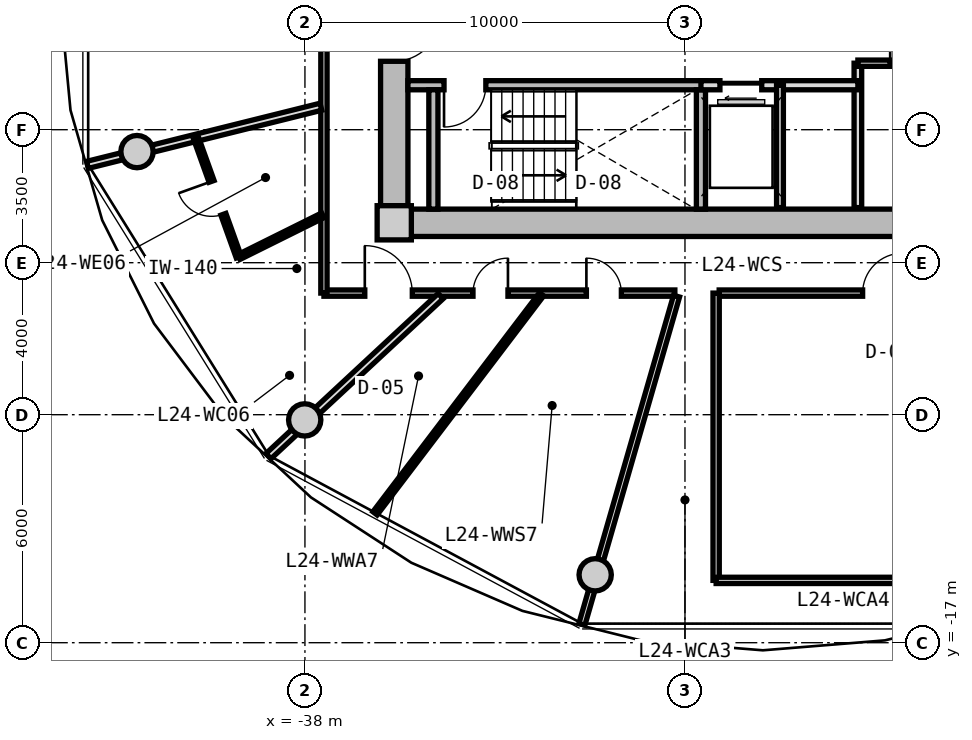
"""IFC4 building model, lengths in metres.
Left out: names, types, materials, properties, quantities, classifications, styles, units other than length and angle.
Written with IfcOpenShell. Run it as: python <this file> out.ifc"""

import sys

from ifc_helpers import new_model, si_unit, direction, frame, frame_2d, origin, origin_2d, place, context, subcontext, project, spatial, rectangle, circle, extrude, source, transform, mapped, element, fill, save


model = new_model("IFC4")
c1 = context("Model", 3, precision=1e-05, world=origin(), true_north=direction((0.0, 1.0)))
c2 = subcontext(c1, "Body", "Model", "MODEL_VIEW")
j1 = project(units=[si_unit("LENGTHUNIT", "METRE"), si_unit("PLANEANGLEUNIT", "RADIAN")], contexts=[c1])
p1 = place(None, origin())
s1 = spatial("IfcSite", under=j1, at=p1, CompositionType="ELEMENT")
p2 = place(p1, origin())
s2 = spatial("IfcBuilding", under=s1, at=p2, CompositionType="ELEMENT")
p3 = place(p2, frame((0.0, 0.0, 81.0)))
s3 = spatial("IfcBuildingStorey", under=s2, at=p3, CompositionType="ELEMENT", Elevation=81.0)
m1 = source(origin(), c2, "Body", "SweptSolid", [
    extrude(rectangle(XDim=0.9, YDim=0.9, at=origin_2d()), origin(), (0.0, 0.0, 1.0), 3.05),
])
p4 = place(p3, frame((-35.65, -5.95, 0.0), z_axis=(0.0, 0.0, 1.0), x_axis=(1.0, 0.0, 0.0)))
e1 = element("IfcColumn", 1, at=p4, inside=s3, PredefinedType="COLUMN", context=c2, shape_type="MappedRepresentation", body=[
    mapped(m1, transform((0.0, 0.0, 0.0), x_axis=(1.0, 0.0, 0.0), y_axis=(0.0, 1.0, 0.0), z_axis=(0.0, 0.0, 1.0), scale=1.0)),
])
m2 = source(origin(), c2, "Body", "SweptSolid", [
    extrude(rectangle(XDim=14.4, YDim=0.72, at=frame_2d((7.2, 0.0))), origin(), (0.0, 0.0, 1.0), 2.79),
])
p5 = place(p3, frame((-20.8, -5.95, 0.0), z_axis=(0.0, 0.0, 1.0), x_axis=(-1.0, 0.0, 0.0)))
e2 = element("IfcWall", 2, at=p5, inside=s3, PredefinedType="SHEAR", context=c2, shape_type="MappedRepresentation", body=[
    mapped(m2, transform((0.0, 0.0, 0.0), x_axis=(1.0, 0.0, 0.0), y_axis=(0.0, 1.0, 0.0), z_axis=(0.0, 0.0, 1.0), scale=1.0)),
])
m3 = source(origin(), c2, "Body", "SweptSolid", [
    extrude(rectangle(XDim=11.0, YDim=0.72, at=frame_2d((5.5, 0.0))), origin(), (0.0, 0.0, 1.0), 2.79),
])
p6 = place(p3, frame((-35.65, -5.5, 0.0), z_axis=(0.0, 0.0, 1.0), x_axis=(0.0, 1.0, 0.0)))
e3 = element("IfcWall", 3, at=p6, inside=s3, PredefinedType="SHEAR", context=c2, shape_type="MappedRepresentation", body=[
    mapped(m3, transform((0.0, 0.0, 0.0), x_axis=(1.0, 0.0, 0.0), y_axis=(0.0, 1.0, 0.0), z_axis=(0.0, 0.0, 1.0), scale=1.0)),
])
p7 = place(p6, frame((3.8, 0.0, 0.0)))
e4 = element("IfcOpeningElement", 4, at=p7, cuts=e3, PredefinedType="OPENING", context=c2, shape_type="SweptSolid", body=[
    extrude(rectangle(XDim=1.2, YDim=2.15, at=frame_2d((0.6, 1.075))), frame((0.0, 0.37, 0.0), z_axis=(0.0, -1.0, 0.0), x_axis=(1.0, 0.0, 0.0)), (0.0, 0.0, 1.0), 0.74),
])
m4 = source(origin(), c2, "Body", "SweptSolid", [
    extrude(circle(Radius=0.425, at=origin_2d()), origin(), (0.0, 0.0, 1.0), 3.05),
])
for number, where, z_axis, x_axis in (
    (5, (-42.419, -4.076, 0.0), (0.0, 0.0, 1.0), (1.0, 0.0, 0.0)),
    (6, (-38.006, -11.137, 0.0), (0.0, 0.0, 1.0), (1.0, 0.0, 0.0)),
    (7, (-30.363, -15.213, 0.0), (0.0, 0.0, 1.0), (1.0, 0.0, 0.0)),
):
    element("IfcColumn", number, at=place(p3, frame(where, z_axis=z_axis, x_axis=x_axis)), inside=s3, PredefinedType="COLUMN", context=c2, shape_type="MappedRepresentation", body=[
        mapped(m4, transform((0.0, 0.0, 0.0), x_axis=(1.0, 0.0, 0.0), y_axis=(0.0, 1.0, 0.0), z_axis=(0.0, 0.0, 1.0), scale=1.0)),
    ])
m5 = source(origin(), c2, "Body", "SweptSolid", [
    extrude(rectangle(XDim=7.83, YDim=0.24, at=frame_2d((3.915, 0.0))), origin(), (0.0, 0.0, 1.0), 2.79),
])
p8 = place(p3, frame((-35.29, -2.33, 0.0), z_axis=(0.0, 0.0, 1.0), x_axis=(1.0, 0.0, 0.0)))
e8 = element("IfcWall", 8, at=p8, inside=s3, PredefinedType="PARTITIONING", context=c2, shape_type="MappedRepresentation", body=[
    mapped(m5, transform((0.0, 0.0, 0.0), x_axis=(1.0, 0.0, 0.0), y_axis=(0.0, 1.0, 0.0), z_axis=(0.0, 0.0, 1.0), scale=1.0)),
])
p9 = place(p8, frame((0.95, 0.0, 0.0)))
e9 = element("IfcOpeningElement", 9, at=p9, cuts=e8, PredefinedType="OPENING", context=c2, shape_type="SweptSolid", body=[
    extrude(rectangle(XDim=1.1, YDim=2.15, at=frame_2d((0.55, 1.075))), frame((0.0, 0.13, 0.0), z_axis=(0.0, -1.0, 0.0), x_axis=(1.0, 0.0, 0.0)), (0.0, 0.0, 1.0), 0.26),
])
m6 = source(origin(), c2, "Body", "SweptSolid", [
    extrude(rectangle(XDim=3.14, YDim=0.24, at=frame_2d((1.57, 0.0))), origin(), (0.0, 0.0, 1.0), 2.79),
])
for number, where, z_axis, x_axis in (
    (10, (-34.62, -5.59, 0.0), (0.0, 0.0, 1.0), (0.0, 1.0, 0.0)),
    (11, (-27.58, -5.59, 0.0), (0.0, 0.0, 1.0), (0.0, 1.0, 0.0)),
):
    element("IfcWall", number, at=place(p3, frame(where, z_axis=z_axis, x_axis=x_axis)), inside=s3, PredefinedType="PARTITIONING", context=c2, shape_type="MappedRepresentation", body=[
        mapped(m6, transform((0.0, 0.0, 0.0), x_axis=(1.0, 0.0, 0.0), y_axis=(0.0, 1.0, 0.0), z_axis=(0.0, 0.0, 1.0), scale=1.0)),
    ])
m7 = source(origin(), c2, "Body", "SweptSolid", [
    extrude(rectangle(XDim=3.8, YDim=0.2, at=frame_2d((1.9, 0.0))), origin(), (0.0, 0.0, 1.0), 2.775),
])
p10 = place(p3, frame((-23.45, -5.55, 0.0), z_axis=(0.0, 0.0, 1.0), x_axis=(0.0, 1.0, 0.0)))
e12 = element("IfcWall", 12, at=p10, inside=s3, PredefinedType="PARTITIONING", context=c2, shape_type="MappedRepresentation", body=[
    mapped(m7, transform((0.0, 0.0, 0.0), x_axis=(1.0, 0.0, 0.0), y_axis=(0.0, 1.0, 0.0), z_axis=(0.0, 0.0, 1.0), scale=1.0)),
])
m8 = source(origin(), c2, "Body", "SweptSolid", [
    extrude(rectangle(XDim=4.13, YDim=0.24, at=frame_2d((2.065, 0.0))), origin(), (0.0, 0.0, 1.0), 2.775),
])
p11 = place(p3, frame((-27.58, -2.33, 0.0), z_axis=(0.0, 0.0, 1.0), x_axis=(1.0, 0.0, 0.0)))
e13 = element("IfcWall", 13, at=p11, inside=s3, PredefinedType="PARTITIONING", context=c2, shape_type="MappedRepresentation", body=[
    mapped(m8, transform((0.0, 0.0, 0.0), x_axis=(1.0, 0.0, 0.0), y_axis=(0.0, 1.0, 0.0), z_axis=(0.0, 0.0, 1.0), scale=1.0)),
])
p12 = place(p11, frame((0.5, 0.0, 0.0)))
e14 = element("IfcOpeningElement", 14, at=p12, cuts=e13, PredefinedType="OPENING", context=c2, shape_type="SweptSolid", body=[
    extrude(rectangle(XDim=1.1, YDim=2.2, at=frame_2d((0.55, 1.1))), frame((0.0, 0.13, 0.0), z_axis=(0.0, -1.0, 0.0), x_axis=(1.0, 0.0, 0.0)), (0.0, 0.0, 1.0), 0.26),
])
m9 = source(origin(), c2, "Body", "SweptSolid", [
    extrude(rectangle(XDim=3.22, YDim=0.18, at=frame_2d((1.61, 0.0))), origin(), (0.0, 0.0, 1.0), 2.775),
])
p13 = place(p3, frame((-25.5, -5.55, 0.0), z_axis=(0.0, 0.0, 1.0), x_axis=(0.0, 1.0, 0.0)))
e15 = element("IfcWall", 15, at=p13, inside=s3, PredefinedType="PARTITIONING", context=c2, shape_type="MappedRepresentation", body=[
    mapped(m9, transform((0.0, 0.0, 0.0), x_axis=(1.0, 0.0, 0.0), y_axis=(0.0, 1.0, 0.0), z_axis=(0.0, 0.0, 1.0), scale=1.0)),
])
m10 = source(origin(), c2, "Body", "SweptSolid", [
    extrude(rectangle(XDim=2.7, YDim=0.165, at=frame_2d((1.35, 0.0))), origin(), (0.0, 0.0, 1.0), 2.775),
])
p14 = place(p3, frame((-23.45, -1.75, 0.0), z_axis=(0.0, 0.0, 1.0), x_axis=(1.0, 0.0, 0.0)))
e16 = element("IfcWall", 16, at=p14, inside=s3, PredefinedType="PARTITIONING", context=c2, shape_type="MappedRepresentation", body=[
    mapped(m10, transform((0.0, 0.0, 0.0), x_axis=(1.0, 0.0, 0.0), y_axis=(0.0, 1.0, 0.0), z_axis=(0.0, 0.0, 1.0), scale=1.0)),
])
p15 = place(p14, frame((0.85, 0.0, 0.0)))
e17 = element("IfcOpeningElement", 17, at=p15, cuts=e16, PredefinedType="OPENING", context=c2, shape_type="SweptSolid", body=[
    extrude(rectangle(XDim=0.925, YDim=2.1, at=frame_2d((0.462, 1.05))), frame((0.0, 0.093, 0.0), z_axis=(0.0, -1.0, 0.0), x_axis=(1.0, 0.0, 0.0)), (0.0, 0.0, 1.0), 0.185),
])
m11 = source(origin(), c2, "Body", "SweptSolid", [
    extrude(rectangle(XDim=8.6, YDim=0.165, at=frame_2d((4.3, 0.0))), origin(), (0.0, 0.0, 1.0), 2.775),
])
p16 = place(p3, frame((-18.5, -7.8, 0.0), z_axis=(0.0, 0.0, 1.0), x_axis=(-1.0, 0.0, 0.0)))
e18 = element("IfcWall", 18, at=p16, inside=s3, PredefinedType="PARTITIONING", context=c2, shape_type="MappedRepresentation", body=[
    mapped(m11, transform((0.0, 0.0, 0.0), x_axis=(1.0, 0.0, 0.0), y_axis=(0.0, 1.0, 0.0), z_axis=(0.0, 0.0, 1.0), scale=1.0)),
])
p17 = place(p16, frame((3.775, 0.0, 0.0)))
e19 = element("IfcOpeningElement", 19, at=p17, cuts=e18, PredefinedType="OPENING", context=c2, shape_type="SweptSolid", body=[
    extrude(rectangle(XDim=1.05, YDim=2.15, at=frame_2d((0.525, 1.075))), frame((0.0, 0.093, 0.0), z_axis=(0.0, -1.0, 0.0), x_axis=(1.0, 0.0, 0.0)), (0.0, 0.0, 1.0), 0.185),
])
m12 = source(origin(), c2, "Body", "SweptSolid", [
    extrude(rectangle(XDim=9.234, YDim=0.165, at=frame_2d((4.617, 0.0))), origin(), (0.0, 0.0, 1.0), 2.775),
])
p18 = place(p3, frame((-28.266, -7.8, 0.0), z_axis=(0.0, 0.0, 1.0), x_axis=(-1.0, 0.0, 0.0)))
e20 = element("IfcWall", 20, at=p18, inside=s3, PredefinedType="PARTITIONING", context=c2, shape_type="MappedRepresentation", body=[
    mapped(m12, transform((0.0, 0.0, 0.0), x_axis=(1.0, 0.0, 0.0), y_axis=(0.0, 1.0, 0.0), z_axis=(0.0, 0.0, 1.0), scale=1.0)),
])
p19 = place(p18, frame((6.909, 0.0, 0.0)))
e21 = element("IfcOpeningElement", 21, at=p19, cuts=e20, PredefinedType="OPENING", context=c2, shape_type="SweptSolid", body=[
    extrude(rectangle(XDim=1.25, YDim=2.2, at=frame_2d((0.625, 1.1))), frame((0.0, 0.093, 0.0), z_axis=(0.0, -1.0, 0.0), x_axis=(1.0, 0.0, 0.0)), (0.0, 0.0, 1.0), 0.185),
])
p20 = place(p18, frame((4.392, 0.0, 0.0)))
e22 = element("IfcOpeningElement", 22, at=p20, cuts=e20, PredefinedType="OPENING", context=c2, shape_type="SweptSolid", body=[
    extrude(rectangle(XDim=0.92, YDim=2.1, at=frame_2d((0.46, 1.05))), frame((0.0, 0.093, 0.0), z_axis=(0.0, -1.0, 0.0), x_axis=(1.0, 0.0, 0.0)), (0.0, 0.0, 1.0), 0.185),
])
p21 = place(p18, frame((1.408, 0.0, 0.0)))
e23 = element("IfcOpeningElement", 23, at=p21, cuts=e20, PredefinedType="OPENING", context=c2, shape_type="SweptSolid", body=[
    extrude(rectangle(XDim=0.92, YDim=2.1, at=frame_2d((0.46, 1.05))), frame((0.0, 0.093, 0.0), z_axis=(0.0, -1.0, 0.0), x_axis=(1.0, 0.0, 0.0)), (0.0, 0.0, 1.0), 0.185),
])
m13 = source(origin(), c2, "Body", "SweptSolid", [
    extrude(rectangle(XDim=15.6, YDim=0.165, at=frame_2d((7.8, 0.0))), origin(), (0.0, 0.0, 1.0), 2.775),
])
p22 = place(p3, frame((-37.5, -7.8, 0.0), z_axis=(0.0, 0.0, 1.0), x_axis=(0.0, 1.0, 0.0)))
e24 = element("IfcWall", 24, at=p22, inside=s3, PredefinedType="PARTITIONING", context=c2, shape_type="MappedRepresentation", body=[
    mapped(m13, transform((0.0, 0.0, 0.0), x_axis=(1.0, 0.0, 0.0), y_axis=(0.0, 1.0, 0.0), z_axis=(0.0, 0.0, 1.0), scale=1.0)),
])
p23 = place(p22, frame((12.399, 0.0, 0.0)))
e25 = element("IfcOpeningElement", 25, at=p23, cuts=e24, PredefinedType="OPENING", context=c2, shape_type="SweptSolid", body=[
    extrude(rectangle(XDim=1.25, YDim=2.2, at=frame_2d((0.625, 1.1))), frame((0.0, 0.093, 0.0), z_axis=(0.0, -1.0, 0.0), x_axis=(1.0, 0.0, 0.0)), (0.0, 0.0, 1.0), 0.185),
])
p24 = place(p22, frame((7.175, 0.0, 0.0)))
e26 = element("IfcOpeningElement", 26, at=p24, cuts=e24, PredefinedType="OPENING", context=c2, shape_type="SweptSolid", body=[
    extrude(rectangle(XDim=1.25, YDim=2.2, at=frame_2d((0.625, 1.1))), frame((0.0, 0.093, 0.0), z_axis=(0.0, -1.0, 0.0), x_axis=(1.0, 0.0, 0.0)), (0.0, 0.0, 1.0), 0.185),
])
m14 = source(origin(), c2, "Body", "SweptSolid", [
    extrude(rectangle(XDim=8.989, YDim=0.165, at=frame_2d((4.495, 0.0))), origin(), (0.0, 0.0, 1.0), 2.275),
])
p25 = place(p3, frame((-28.222, -7.88, 0.0), z_axis=(0.0, 0.0, 1.0), x_axis=(-0.27702323008, -0.960863221274, 0.0)))
e27 = element("IfcWall", 27, at=p25, inside=s3, PredefinedType="PARTITIONING", context=c2, shape_type="MappedRepresentation", body=[
    mapped(m14, transform((0.0, 0.0, 0.0), x_axis=(1.0, 0.0, 0.0), y_axis=(0.0, 1.0, 0.0), z_axis=(0.0, 0.0, 1.0), scale=1.0)),
])
m15 = source(origin(), c2, "Body", "SweptSolid", [
    extrude(rectangle(XDim=7.56, YDim=0.165, at=frame_2d((3.78, 0.0))), origin(), (0.0, 0.0, 1.0), 2.775),
])
p26 = place(p3, frame((-27.18, -15.36, 0.0), z_axis=(0.0, 0.0, 1.0), x_axis=(0.0, 1.0, 0.0)))
e28 = element("IfcWall", 28, at=p26, inside=s3, PredefinedType="PARTITIONING", context=c2, shape_type="MappedRepresentation", body=[
    mapped(m15, transform((0.0, 0.0, 0.0), x_axis=(1.0, 0.0, 0.0), y_axis=(0.0, 1.0, 0.0), z_axis=(0.0, 0.0, 1.0), scale=1.0)),
])
m16 = source(origin(), c2, "Body", "SweptSolid", [
    extrude(rectangle(XDim=8.407, YDim=0.165, at=frame_2d((4.204, 0.0))), origin(), (0.0, 0.0, 1.0), 2.275),
])
p27 = place(p3, frame((-27.18, -15.36, 0.0), z_axis=(0.0, 0.0, 1.0), x_axis=(1.0, 0.0, 0.0)))
e29 = element("IfcWall", 29, at=p27, inside=s3, PredefinedType="PARTITIONING", context=c2, shape_type="MappedRepresentation", body=[
    mapped(m16, transform((0.0, 0.0, 0.0), x_axis=(1.0, 0.0, 0.0), y_axis=(0.0, 1.0, 0.0), z_axis=(0.0, 0.0, 1.0), scale=1.0)),
])
m17 = source(origin(), c2, "Body", "SweptSolid", [
    extrude(rectangle(XDim=6.331, YDim=0.19, at=frame_2d((3.165, 0.0))), origin(), (0.0, 0.0, 1.0), 2.275),
])
p28 = place(p3, frame((-37.58, -2.896, 0.0), z_axis=(0.0, 0.0, 1.0), x_axis=(-0.97036440661, -0.241646267062, 0.0)))
e30 = element("IfcWall", 30, at=p28, inside=s3, PredefinedType="PARTITIONING", context=c2, shape_type="MappedRepresentation", body=[
    mapped(m17, transform((0.0, 0.0, 0.0), x_axis=(1.0, 0.0, 0.0), y_axis=(0.0, 1.0, 0.0), z_axis=(0.0, 0.0, 1.0), scale=1.0)),
])
m18 = source(origin(), c2, "Body", "SweptSolid", [
    extrude(rectangle(XDim=6.187, YDim=0.19, at=frame_2d((3.093, 0.0))), origin(), (0.0, 0.0, 1.0), 2.275),
])
p29 = place(p3, frame((-34.429, -7.88, 0.0), z_axis=(0.0, 0.0, 1.0), x_axis=(-0.732501077882, -0.680765870841, 0.0)))
e31 = element("IfcWall", 31, at=p29, inside=s3, PredefinedType="PARTITIONING", context=c2, shape_type="MappedRepresentation", body=[
    mapped(m18, transform((0.0, 0.0, 0.0), x_axis=(1.0, 0.0, 0.0), y_axis=(0.0, 1.0, 0.0), z_axis=(0.0, 0.0, 1.0), scale=1.0)),
])
m19 = source(origin(), c2, "Body", "SweptSolid", [
    extrude(rectangle(XDim=2.469, YDim=0.14, at=frame_2d((1.235, 0.0))), origin(), (0.0, 0.0, 1.0), 2.775),
])
p30 = place(p3, frame((-37.53, -5.754, 0.0), z_axis=(0.0, 0.0, 1.0), x_axis=(-0.895512172456, -0.445037019789, 0.0)))
e32 = element("IfcWall", 32, at=p30, inside=s3, PredefinedType="PARTITIONING", context=c2, shape_type="MappedRepresentation", body=[
    mapped(m19, transform((0.0, 0.0, 0.0), x_axis=(1.0, 0.0, 0.0), y_axis=(0.0, 1.0, 0.0), z_axis=(0.0, 0.0, 1.0), scale=1.0)),
])
m20 = source(origin(), c2, "Body", "SweptSolid", [
    extrude(rectangle(XDim=3.314, YDim=0.14, at=frame_2d((1.657, 0.0))), origin(), (0.0, 0.0, 1.0), 2.775),
])
p31 = place(p3, frame((-39.741, -6.853, 0.0), z_axis=(0.0, 0.0, 1.0), x_axis=(-0.338067217654, 0.941121966776, 0.0)))
e33 = element("IfcWall", 33, at=p31, inside=s3, PredefinedType="PARTITIONING", context=c2, shape_type="MappedRepresentation", body=[
    mapped(m20, transform((0.0, 0.0, 0.0), x_axis=(1.0, 0.0, 0.0), y_axis=(0.0, 1.0, 0.0), z_axis=(0.0, 0.0, 1.0), scale=1.0)),
])
p32 = place(p31, frame((1.197, 0.0, 0.0)))
e34 = element("IfcOpeningElement", 34, at=p32, cuts=e33, PredefinedType="OPENING", context=c2, shape_type="SweptSolid", body=[
    extrude(rectangle(XDim=0.92, YDim=2.1, at=frame_2d((0.46, 1.05))), frame((0.0, 0.08, 0.0), z_axis=(0.0, -1.0, 0.0), x_axis=(1.0, 0.0, 0.0)), (0.0, 0.0, 1.0), 0.16),
])
m21 = source(origin(), c2, "Body", "SweptSolid", [
    extrude(rectangle(XDim=7.243, YDim=0.14, at=frame_2d((3.621, 0.0))), origin(), (0.0, 0.0, 1.0), 2.775),
])
p33 = place(p3, frame((-31.774, -7.83, 0.0), z_axis=(0.0, 0.0, 1.0), x_axis=(-0.605111472002, -0.796140757939, 0.0)))
e35 = element("IfcWall", 35, at=p33, inside=s3, PredefinedType="PARTITIONING", context=c2, shape_type="MappedRepresentation", body=[
    mapped(m21, transform((0.0, 0.0, 0.0), x_axis=(1.0, 0.0, 0.0), y_axis=(0.0, 1.0, 0.0), z_axis=(0.0, 0.0, 1.0), scale=1.0)),
])
m22 = source(origin(), c2, "Body", "SweptSolid", [
    extrude(rectangle(XDim=1.1, YDim=2.15, at=frame_2d((0.55, 1.075))), frame((0.0, 0.025, 0.0), z_axis=(0.0, -1.0, 0.0), x_axis=(1.0, 0.0, 0.0)), (0.0, 0.0, 1.0), 0.05),
])
p34 = place(p9, frame((1.1, 0.0, 0.0), z_axis=(0.0, 0.0, 1.0), x_axis=(-1.0, 0.0, 0.0)))
e36 = element("IfcDoor", 36, at=p34, inside=s3, OperationType="SINGLE_SWING_RIGHT", PredefinedType="DOOR", context=c2, shape_type="MappedRepresentation", body=[
    mapped(m22, transform((0.0, 0.0, 0.0), x_axis=(1.0, 0.0, 0.0), y_axis=(0.0, 1.0, 0.0), z_axis=(0.0, 0.0, 1.0), scale=1.0)),
])
fill(e9, e36)
m23 = source(origin(), c2, "Body", "SweptSolid", [
    extrude(rectangle(XDim=1.2, YDim=2.15, at=frame_2d((0.6, 1.075))), frame((0.0, 0.025, 0.0), z_axis=(0.0, -1.0, 0.0), x_axis=(1.0, 0.0, 0.0)), (0.0, 0.0, 1.0), 0.05),
])
p35 = place(p7, frame((1.2, 0.0, 0.0), z_axis=(0.0, 0.0, 1.0), x_axis=(-1.0, 0.0, 0.0)))
e37 = element("IfcDoor", 37, at=p35, inside=s3, OperationType="SINGLE_SWING_LEFT", PredefinedType="DOOR", context=c2, shape_type="MappedRepresentation", body=[
    mapped(m23, transform((0.0, 0.0, 0.0), x_axis=(1.0, 0.0, 0.0), y_axis=(0.0, 1.0, 0.0), z_axis=(0.0, 0.0, 1.0), scale=1.0)),
])
fill(e4, e37)
m24 = source(origin(), c2, "Body", "SweptSolid", [
    extrude(rectangle(XDim=1.1, YDim=2.2, at=frame_2d((0.55, 1.1))), frame((0.0, 0.025, 0.0), z_axis=(0.0, -1.0, 0.0), x_axis=(1.0, 0.0, 0.0)), (0.0, 0.0, 1.0), 0.05),
])
p36 = place(p12, frame((1.1, 0.0, 0.0), z_axis=(0.0, 0.0, 1.0), x_axis=(-1.0, 0.0, 0.0)))
e38 = element("IfcDoor", 38, at=p36, inside=s3, OperationType="SLIDING_TO_LEFT", PredefinedType="DOOR", context=c2, shape_type="MappedRepresentation", body=[
    mapped(m24, transform((0.0, 0.0, 0.0), x_axis=(1.0, 0.0, 0.0), y_axis=(0.0, 1.0, 0.0), z_axis=(0.0, 0.0, 1.0), scale=1.0)),
])
fill(e14, e38)
m25 = source(origin(), c2, "Body", "SweptSolid", [
    extrude(rectangle(XDim=0.925, YDim=2.1, at=frame_2d((0.462, 1.05))), frame((0.0, 0.025, 0.0), z_axis=(0.0, -1.0, 0.0), x_axis=(1.0, 0.0, 0.0)), (0.0, 0.0, 1.0), 0.05),
])
p37 = place(p15, origin())
e39 = element("IfcDoor", 39, at=p37, inside=s3, OperationType="SINGLE_SWING_LEFT", PredefinedType="DOOR", context=c2, shape_type="MappedRepresentation", body=[
    mapped(m25, transform((0.0, 0.0, 0.0), x_axis=(1.0, 0.0, 0.0), y_axis=(0.0, 1.0, 0.0), z_axis=(0.0, 0.0, 1.0), scale=1.0)),
])
fill(e17, e39)
m26 = source(origin(), c2, "Body", "SweptSolid", [
    extrude(rectangle(XDim=1.05, YDim=2.15, at=frame_2d((0.525, 1.075))), frame((0.0, 0.025, 0.0), z_axis=(0.0, -1.0, 0.0), x_axis=(1.0, 0.0, 0.0)), (0.0, 0.0, 1.0), 0.05),
])
p38 = place(p17, frame((1.05, 0.0, 0.0), z_axis=(0.0, 0.0, 1.0), x_axis=(-1.0, 0.0, 0.0)))
e40 = element("IfcDoor", 40, at=p38, inside=s3, OperationType="SINGLE_SWING_RIGHT", PredefinedType="DOOR", context=c2, shape_type="MappedRepresentation", body=[
    mapped(m26, transform((0.0, 0.0, 0.0), x_axis=(1.0, 0.0, 0.0), y_axis=(0.0, 1.0, 0.0), z_axis=(0.0, 0.0, 1.0), scale=1.0)),
])
fill(e19, e40)
m27 = source(origin(), c2, "Body", "SweptSolid", [
    extrude(rectangle(XDim=1.25, YDim=2.2, at=frame_2d((0.625, 1.1))), frame((0.0, 0.025, 0.0), z_axis=(0.0, -1.0, 0.0), x_axis=(1.0, 0.0, 0.0)), (0.0, 0.0, 1.0), 0.05),
])
p39 = place(p19, frame((1.25, 0.0, 0.0), z_axis=(0.0, 0.0, 1.0), x_axis=(-1.0, 0.0, 0.0)))
e41 = element("IfcDoor", 41, at=p39, inside=s3, OperationType="SINGLE_SWING_LEFT", PredefinedType="DOOR", context=c2, shape_type="MappedRepresentation", body=[
    mapped(m27, transform((0.0, 0.0, 0.0), x_axis=(1.0, 0.0, 0.0), y_axis=(0.0, 1.0, 0.0), z_axis=(0.0, 0.0, 1.0), scale=1.0)),
])
fill(e21, e41)
m28 = source(origin(), c2, "Body", "SweptSolid", [
    extrude(rectangle(XDim=0.92, YDim=2.1, at=frame_2d((0.46, 1.05))), frame((0.0, 0.025, 0.0), z_axis=(0.0, -1.0, 0.0), x_axis=(1.0, 0.0, 0.0)), (0.0, 0.0, 1.0), 0.05),
])
p40 = place(p32, origin())
e42 = element("IfcDoor", 42, at=p40, inside=s3, OperationType="SINGLE_SWING_RIGHT", PredefinedType="DOOR", context=c2, shape_type="MappedRepresentation", body=[
    mapped(m28, transform((0.0, 0.0, 0.0), x_axis=(1.0, 0.0, 0.0), y_axis=(0.0, 1.0, 0.0), z_axis=(0.0, 0.0, 1.0), scale=1.0)),
])
fill(e34, e42)
p41 = place(p20, frame((0.92, 0.0, 0.0), z_axis=(0.0, 0.0, 1.0), x_axis=(-1.0, 0.0, 0.0)))
e43 = element("IfcDoor", 43, at=p41, inside=s3, OperationType="SINGLE_SWING_RIGHT", PredefinedType="DOOR", context=c2, shape_type="MappedRepresentation", body=[
    mapped(m28, transform((0.0, 0.0, 0.0), x_axis=(1.0, 0.0, 0.0), y_axis=(0.0, 1.0, 0.0), z_axis=(0.0, 0.0, 1.0), scale=1.0)),
])
fill(e22, e43)
p42 = place(p21, frame((0.92, 0.0, 0.0), z_axis=(0.0, 0.0, 1.0), x_axis=(-1.0, 0.0, 0.0)))
e44 = element("IfcDoor", 44, at=p42, inside=s3, OperationType="SINGLE_SWING_LEFT", PredefinedType="DOOR", context=c2, shape_type="MappedRepresentation", body=[
    mapped(m28, transform((0.0, 0.0, 0.0), x_axis=(1.0, 0.0, 0.0), y_axis=(0.0, 1.0, 0.0), z_axis=(0.0, 0.0, 1.0), scale=1.0)),
])
fill(e23, e44)
save(model, sys.argv[1])
